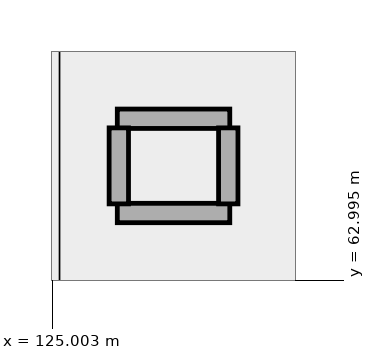
"""IFC4 building model, lengths in metres.
Left out: names, types, materials, properties, quantities, classifications, styles, units other than length and angle.
Written with IfcOpenShell. Run it as: python <this file> out.ifc"""

import sys

from ifc_helpers import new_model, si_unit, direction, frame, frame_2d, origin, place, context, subcontext, project, spatial, rectangle, extrude, element, save


model = new_model("IFC4")
c1 = context("Model", 3, precision=1e-05, world=origin(), true_north=direction((0.0, 1.0)))
c2 = subcontext(c1, "Body", "Model", "MODEL_VIEW")
j1 = project(units=[si_unit("LENGTHUNIT", "METRE"), si_unit("PLANEANGLEUNIT", "RADIAN")], contexts=[c1])
p1 = place(None, origin())
s1 = spatial("IfcSite", under=j1, at=p1, CompositionType="ELEMENT")
p2 = place(p1, origin())
s2 = spatial("IfcBuilding", under=s1, at=p2, CompositionType="ELEMENT")
p3 = place(p2, frame((0.0, 0.0, 20.7)))
s3 = spatial("IfcBuildingStorey", under=s2, at=p3, CompositionType="ELEMENT", Elevation=20.7)
for number, where, z_axis, x_axis in (
    (1, (125.86, 65.12, 0.0), (0.0, 0.0, 1.0), (1.0, 0.0, 0.0)),
    (2, (125.86, 63.88, 0.0), (0.0, 0.0, 1.0), (1.0, 0.0, 0.0)),
):
    element("IfcWall", number, at=place(p3, frame(where, z_axis=z_axis, x_axis=x_axis)), inside=s3, PredefinedType="PARTITIONING", context=c2, shape_type="SweptSolid", body=[
        extrude(rectangle(XDim=1.48, YDim=0.255, at=frame_2d((0.74, 0.0))), origin(), (0.0, 0.0, 1.0), 4.98),
    ])
for number, where, z_axis, x_axis in (
    (3, (125.88, 64.0, 0.0), (0.0, 0.0, 1.0), (0.0, 1.0, 0.0)),
    (4, (127.32, 64.0, 0.0), (0.0, 0.0, 1.0), (0.0, 1.0, 0.0)),
):
    element("IfcWall", number, at=place(p3, frame(where, z_axis=z_axis, x_axis=x_axis)), inside=s3, PredefinedType="PARTITIONING", context=c2, shape_type="SweptSolid", body=[
        extrude(rectangle(XDim=1.0, YDim=0.255, at=frame_2d((0.5, 0.0))), origin(), (0.0, 0.0, 1.0), 4.98),
    ])
save(model, sys.argv[1])
